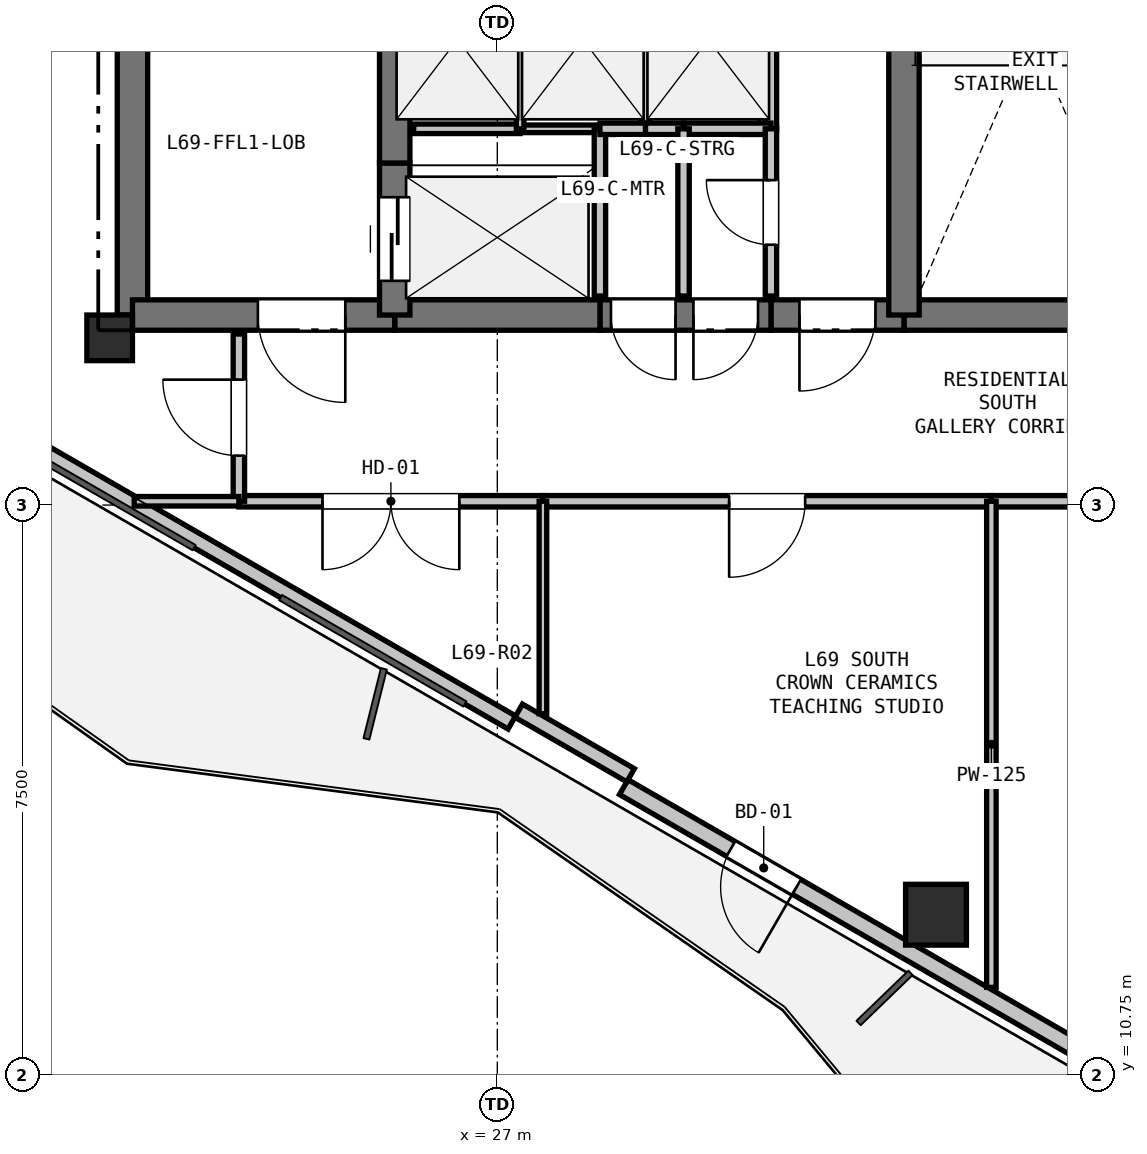
"""IFC4 building model, lengths in metres.
Left out: names, types, materials, properties, quantities, classifications, styles, units other than length and angle.
Written with IfcOpenShell. Run it as: python <this file> out.ifc"""

import sys

from ifc_helpers import new_model, si_unit, direction, frame, frame_2d, origin, origin_2d, place, context, subcontext, project, spatial, rectangle, hollow_rectangle, extrude, element, fill, save


model = new_model("IFC4")
c1 = context("Model", 3, precision=1e-05, world=origin(), true_north=direction((0.0, 1.0)))
c2 = subcontext(c1, "Body", "Model", "MODEL_VIEW")
j1 = project(units=[si_unit("LENGTHUNIT", "METRE"), si_unit("PLANEANGLEUNIT", "RADIAN")], contexts=[c1])
p1 = place(None, origin())
s1 = spatial("IfcSite", under=j1, at=p1, CompositionType="ELEMENT")
p2 = place(p1, origin())
s2 = spatial("IfcBuilding", under=s1, at=p2, CompositionType="ELEMENT")
p3 = place(p2, frame((0.0, 0.0, 246.3)))
s3 = spatial("IfcBuildingStorey", under=s2, at=p3, CompositionType="ELEMENT", Elevation=246.3)
p4 = place(p3, frame((21.9, 20.45, 0.0), z_axis=(0.0, 0.0, 1.0), x_axis=(1.0, 0.0, 0.0)))
e1 = element("IfcColumn", 1, at=p4, inside=s3, PredefinedType="COLUMN", context=c2, shape_type="SweptSolid", body=[
    extrude(rectangle(XDim=0.6, YDim=0.6, at=origin_2d()), origin(), (0.0, 0.0, 1.0), 3.3),
])
p5 = place(p3, frame((32.771, 12.861, 0.0), z_axis=(0.0, 0.0, 1.0), x_axis=(1.0, 0.0, 0.0)))
e2 = element("IfcColumn", 2, at=p5, inside=s3, PredefinedType="COLUMN", context=c2, shape_type="SweptSolid", body=[
    extrude(hollow_rectangle(XDim=0.8, YDim=0.8, WallThickness=0.025, at=origin_2d()), origin(), (0.0, 0.0, 1.0), 3.3),
])
p6 = place(p3, frame((36.395, 10.076, 0.0), z_axis=(0.0, 0.0, 1.0), x_axis=(-0.866026655105, 0.499997832642, 0.0)))
e3 = element("IfcWall", 3, at=p6, inside=s3, PredefinedType="SOLIDWALL", context=c2, shape_type="SweptSolid", body=[
    extrude(rectangle(XDim=8.928, YDim=0.225, at=frame_2d((4.464, 0.0))), origin(), (0.0, 0.0, 1.0), 2.64),
])
p7 = place(p6, frame((6.302, 0.0, 0.0)))
e4 = element("IfcOpeningElement", 4, at=p7, cuts=e3, PredefinedType="OPENING", context=c2, shape_type="SweptSolid", body=[
    extrude(rectangle(XDim=1.0, YDim=2.1, at=frame_2d((0.5, 1.05))), frame((0.0, 0.123, 0.0), z_axis=(0.0, -1.0, 0.0), x_axis=(1.0, 0.0, 0.0)), (0.0, 0.0, 1.0), 0.245),
])
p8 = place(p3, frame((27.191, 15.389, 0.0), z_axis=(0.0, 0.0, 1.0), x_axis=(-0.866019557082, 0.500010126649, 0.0)))
e5 = element("IfcWall", 5, at=p8, inside=s3, PredefinedType="PARAPET", context=c2, shape_type="SweptSolid", body=[
    extrude(rectangle(XDim=8.228, YDim=0.2, at=frame_2d((4.114, 0.0))), origin(), (0.0, 0.0, 1.0), 0.2),
])
p9 = place(p3, frame((28.754, 14.695, 0.0), z_axis=(0.0, 0.0, 1.0), x_axis=(-0.866025371046, 0.500000056704, 0.0)))
e6 = element("IfcWall", 6, at=p9, inside=s3, PredefinedType="PARAPET", context=c2, shape_type="SweptSolid", body=[
    extrude(rectangle(XDim=1.7, YDim=0.2, at=frame_2d((0.85, 0.0))), origin(), (0.0, 0.0, 1.0), 2.64),
])
p10 = place(p3, frame((22.2, 20.75, 0.0), z_axis=(0.0, 0.0, 1.0), x_axis=(0.0, 1.0, 0.0)))
e7 = element("IfcWall", 7, at=p10, inside=s3, PredefinedType="SHEAR", context=c2, shape_type="SweptSolid", body=[
    extrude(rectangle(XDim=4.65, YDim=0.4, at=frame_2d((2.325, 0.0))), origin(), (0.0, 0.0, 1.0), 3.02),
])
p11 = place(p3, frame((35.8, 20.75, 0.0), z_axis=(0.0, 0.0, 1.0), x_axis=(-1.0, 0.0, 0.0)))
e8 = element("IfcWall", 8, at=p11, inside=s3, PredefinedType="SHEAR", context=c2, shape_type="SweptSolid", body=[
    extrude(rectangle(XDim=3.45, YDim=0.4, at=frame_2d((1.725, 0.0))), origin(), (0.0, 0.0, 1.0), 3.02),
])
p12 = place(p3, frame((32.35, 20.75, 0.0), z_axis=(0.0, 0.0, 1.0), x_axis=(-1.0, 0.0, 0.0)))
e9 = element("IfcWall", 9, at=p12, inside=s3, PredefinedType="SHEAR", context=c2, shape_type="SweptSolid", body=[
    extrude(rectangle(XDim=1.75, YDim=0.4, at=frame_2d((0.875, 0.0))), origin(), (0.0, 0.0, 1.0), 3.02),
])
p13 = place(p12, frame((0.375, 0.0, 0.0)))
e10 = element("IfcOpeningElement", 10, at=p13, cuts=e9, PredefinedType="OPENING", context=c2, shape_type="SweptSolid", body=[
    extrude(rectangle(XDim=1.0, YDim=2.15, at=frame_2d((0.5, 1.075))), frame((0.0, 0.21, 0.0), z_axis=(0.0, -1.0, 0.0), x_axis=(1.0, 0.0, 0.0)), (0.0, 0.0, 1.0), 0.42),
])
p14 = place(p3, frame((30.6, 20.75, 0.0), z_axis=(0.0, 0.0, 1.0), x_axis=(-1.0, 0.0, 0.0)))
e11 = element("IfcWall", 11, at=p14, inside=s3, PredefinedType="SHEAR", context=c2, shape_type="SweptSolid", body=[
    extrude(rectangle(XDim=2.25, YDim=0.4, at=frame_2d((1.125, 0.0))), origin(), (0.0, 0.0, 1.0), 3.02),
])
p15 = place(p14, frame((1.255, 0.0, 0.0)))
e12 = element("IfcOpeningElement", 12, at=p15, cuts=e11, PredefinedType="OPENING", context=c2, shape_type="SweptSolid", body=[
    extrude(rectangle(XDim=0.85, YDim=2.1, at=frame_2d((0.425, 1.05))), frame((0.0, 0.21, 0.0), z_axis=(0.0, -1.0, 0.0), x_axis=(1.0, 0.0, 0.0)), (0.0, 0.0, 1.0), 0.42),
])
p16 = place(p14, frame((0.17, 0.0, 0.0)))
e13 = element("IfcOpeningElement", 13, at=p16, cuts=e11, PredefinedType="OPENING", context=c2, shape_type="SweptSolid", body=[
    extrude(rectangle(XDim=0.85, YDim=2.1, at=frame_2d((0.425, 1.05))), frame((0.0, 0.21, 0.0), z_axis=(0.0, -1.0, 0.0), x_axis=(1.0, 0.0, 0.0)), (0.0, 0.0, 1.0), 0.42),
])
p17 = place(p3, frame((28.35, 20.75, 0.0), z_axis=(0.0, 0.0, 1.0), x_axis=(-1.0, 0.0, 0.0)))
e14 = element("IfcWall", 14, at=p17, inside=s3, PredefinedType="SHEAR", context=c2, shape_type="SweptSolid", body=[
    extrude(rectangle(XDim=2.7, YDim=0.4, at=frame_2d((1.35, 0.0))), origin(), (0.0, 0.0, 1.0), 3.02),
])
p18 = place(p3, frame((25.65, 20.75, 0.0), z_axis=(0.0, 0.0, 1.0), x_axis=(-1.0, 0.0, 0.0)))
e15 = element("IfcWall", 15, at=p18, inside=s3, PredefinedType="SHEAR", context=c2, shape_type="SweptSolid", body=[
    extrude(rectangle(XDim=3.45, YDim=0.4, at=frame_2d((1.725, 0.0))), origin(), (0.0, 0.0, 1.0), 3.02),
])
p19 = place(p18, frame((0.65, 0.0, 0.0)))
e16 = element("IfcOpeningElement", 16, at=p19, cuts=e15, PredefinedType="OPENING", context=c2, shape_type="SweptSolid", body=[
    extrude(rectangle(XDim=1.15, YDim=2.15, at=frame_2d((0.575, 1.075))), frame((0.0, 0.21, 0.0), z_axis=(0.0, -1.0, 0.0), x_axis=(1.0, 0.0, 0.0)), (0.0, 0.0, 1.0), 0.42),
])
p20 = place(p3, frame((25.65, 20.75, 0.0), z_axis=(0.0, 0.0, 1.0), x_axis=(0.0, 1.0, 0.0)))
e17 = element("IfcWall", 17, at=p20, inside=s3, PredefinedType="SHEAR", context=c2, shape_type="SweptSolid", body=[
    extrude(rectangle(XDim=2.0, YDim=0.4, at=frame_2d((1.0, 0.0))), origin(), (0.0, 0.0, 1.0), 3.02),
])
p21 = place(p20, frame((0.45, 0.0, 0.0)))
e18 = element("IfcOpeningElement", 18, at=p21, cuts=e17, PredefinedType="OPENING", context=c2, shape_type="SweptSolid", body=[
    extrude(rectangle(XDim=1.1, YDim=2.15, at=frame_2d((0.55, 1.075))), frame((0.0, 0.21, 0.0), z_axis=(0.0, -1.0, 0.0), x_axis=(1.0, 0.0, 0.0)), (0.0, 0.0, 1.0), 0.42),
])
p22 = place(p3, frame((25.65, 22.75, 0.0), z_axis=(0.0, 0.0, 1.0), x_axis=(0.0, 1.0, 0.0)))
e19 = element("IfcWall", 19, at=p22, inside=s3, PredefinedType="SHEAR", context=c2, shape_type="SweptSolid", body=[
    extrude(rectangle(XDim=2.8, YDim=0.4, at=frame_2d((1.4, 0.0))), origin(), (0.0, 0.0, 1.0), 3.02),
])
p23 = place(p3, frame((32.35, 20.75, 0.0), z_axis=(0.0, 0.0, 1.0), x_axis=(0.0, 1.0, 0.0)))
e20 = element("IfcWall", 20, at=p23, inside=s3, PredefinedType="SHEAR", context=c2, shape_type="SweptSolid", body=[
    extrude(rectangle(XDim=4.8, YDim=0.4, at=frame_2d((2.4, 0.0))), origin(), (0.0, 0.0, 1.0), 3.02),
])
p24 = place(p3, frame((25.9, 23.2, 0.0), z_axis=(0.0, 0.0, 1.0), x_axis=(1.0, 0.0, 0.0)))
e21 = element("IfcWall", 21, at=p24, inside=s3, PredefinedType="PARTITIONING", context=c2, shape_type="SweptSolid", body=[
    extrude(rectangle(XDim=1.4, YDim=0.125, at=frame_2d((0.7, 0.0))), origin(), (0.0, 0.0, 1.0), 3.02),
])
p25 = place(p3, frame((27.3, 23.2, 0.0), z_axis=(0.0, 0.0, 1.0), x_axis=(1.0, 0.0, 0.0)))
e22 = element("IfcWall", 22, at=p25, inside=s3, PredefinedType="PARTITIONING", context=c2, shape_type="SweptSolid", body=[
    extrude(rectangle(XDim=1.05, YDim=0.1, at=frame_2d((0.525, 0.0))), origin(), (0.0, 0.0, 1.0), 3.02),
])
p26 = place(p3, frame((28.35, 23.2, 0.0), z_axis=(0.0, 0.0, 1.0), x_axis=(0.0, -1.0, 0.0)))
e23 = element("IfcWall", 23, at=p26, inside=s3, PredefinedType="PARTITIONING", context=c2, shape_type="SweptSolid", body=[
    extrude(rectangle(XDim=2.2, YDim=0.15, at=frame_2d((1.1, 0.0))), origin(), (0.0, 0.0, 1.0), 3.02),
])
p27 = place(p3, frame((27.3, 25.4, 0.0), z_axis=(0.0, 0.0, 1.0), x_axis=(0.0, -1.0, 0.0)))
e24 = element("IfcWall", 24, at=p27, inside=s3, PredefinedType="PARTITIONING", context=c2, shape_type="SweptSolid", body=[
    extrude(rectangle(XDim=2.2, YDim=0.1, at=frame_2d((1.1, 0.0))), origin(), (0.0, 0.0, 1.0), 3.02),
])
p28 = place(p3, frame((28.95, 25.4, 0.0), z_axis=(0.0, 0.0, 1.0), x_axis=(0.0, -1.0, 0.0)))
e25 = element("IfcWall", 25, at=p28, inside=s3, PredefinedType="PARTITIONING", context=c2, shape_type="SweptSolid", body=[
    extrude(rectangle(XDim=2.2, YDim=0.125, at=frame_2d((1.1, 0.0))), origin(), (0.0, 0.0, 1.0), 3.02),
])
p29 = place(p3, frame((28.95, 23.2, 0.0), z_axis=(0.0, 0.0, 1.0), x_axis=(-1.0, 0.0, 0.0)))
e26 = element("IfcWall", 26, at=p29, inside=s3, PredefinedType="PARTITIONING", context=c2, shape_type="SweptSolid", body=[
    extrude(rectangle(XDim=0.6, YDim=0.15, at=frame_2d((0.3, 0.0))), origin(), (0.0, 0.0, 1.0), 3.02),
])
p30 = place(p3, frame((30.6, 25.4, 0.0), z_axis=(0.0, 0.0, 1.0), x_axis=(0.0, -1.0, 0.0)))
e27 = element("IfcWall", 27, at=p30, inside=s3, PredefinedType="PARTITIONING", context=c2, shape_type="SweptSolid", body=[
    extrude(rectangle(XDim=2.2, YDim=0.15, at=frame_2d((1.1, 0.0))), origin(), (0.0, 0.0, 1.0), 3.02),
])
p31 = place(p3, frame((30.6, 23.2, 0.0), z_axis=(0.0, 0.0, 1.0), x_axis=(-1.0, 0.0, 0.0)))
e28 = element("IfcWall", 28, at=p31, inside=s3, PredefinedType="PARTITIONING", context=c2, shape_type="SweptSolid", body=[
    extrude(rectangle(XDim=1.15, YDim=0.15, at=frame_2d((0.575, 0.0))), origin(), (0.0, 0.0, 1.0), 3.02),
])
p32 = place(p3, frame((29.45, 23.2, 0.0), z_axis=(0.0, 0.0, 1.0), x_axis=(-1.0, 0.0, 0.0)))
e29 = element("IfcWall", 29, at=p32, inside=s3, PredefinedType="PARTITIONING", context=c2, shape_type="SweptSolid", body=[
    extrude(rectangle(XDim=0.5, YDim=0.15, at=frame_2d((0.25, 0.0))), origin(), (0.0, 0.0, 1.0), 3.02),
])
p33 = place(p3, frame((30.6, 21.0, 0.0), z_axis=(0.0, 0.0, 1.0), x_axis=(0.0, 1.0, 0.0)))
e30 = element("IfcWall", 30, at=p33, inside=s3, PredefinedType="PARTITIONING", context=c2, shape_type="SweptSolid", body=[
    extrude(rectangle(XDim=2.2, YDim=0.15, at=frame_2d((1.1, 0.0))), origin(), (0.0, 0.0, 1.0), 3.02),
])
p34 = place(p33, frame((0.675, 0.0, 0.0)))
e31 = element("IfcOpeningElement", 31, at=p34, cuts=e30, PredefinedType="OPENING", context=c2, shape_type="SweptSolid", body=[
    extrude(rectangle(XDim=0.85, YDim=2.1, at=frame_2d((0.425, 1.05))), frame((0.0, 0.085, 0.0), z_axis=(0.0, -1.0, 0.0), x_axis=(1.0, 0.0, 0.0)), (0.0, 0.0, 1.0), 0.17),
])
p35 = place(p3, frame((38.2, 18.3, 0.0), z_axis=(0.0, 0.0, 1.0), x_axis=(-1.0, 0.0, 0.0)))
e32 = element("IfcWall", 32, at=p35, inside=s3, PredefinedType="PARTITIONING", context=c2, shape_type="SweptSolid", body=[
    extrude(rectangle(XDim=4.7, YDim=0.15, at=frame_2d((2.35, 0.0))), origin(), (0.0, 0.0, 1.0), 2.468),
])
p36 = place(p35, frame((1.85, 0.0, 0.0)))
e33 = element("IfcOpeningElement", 33, at=p36, cuts=e32, PredefinedType="OPENING", context=c2, shape_type="SweptSolid", body=[
    extrude(rectangle(XDim=1.0, YDim=2.15, at=frame_2d((0.5, 1.075))), frame((0.0, 0.085, 0.0), z_axis=(0.0, -1.0, 0.0), x_axis=(1.0, 0.0, 0.0)), (0.0, 0.0, 1.0), 0.17),
])
p37 = place(p3, frame((33.5, 18.3, 0.0), z_axis=(0.0, 0.0, 1.0), x_axis=(-1.0, 0.0, 0.0)))
e34 = element("IfcWall", 34, at=p37, inside=s3, PredefinedType="PARTITIONING", context=c2, shape_type="SweptSolid", body=[
    extrude(rectangle(XDim=5.9, YDim=0.15, at=frame_2d((2.95, 0.0))), origin(), (0.0, 0.0, 1.0), 3.02),
])
p38 = place(p37, frame((2.45, 0.0, 0.0)))
e35 = element("IfcOpeningElement", 35, at=p38, cuts=e34, PredefinedType="OPENING", context=c2, shape_type="SweptSolid", body=[
    extrude(rectangle(XDim=1.0, YDim=2.15, at=frame_2d((0.5, 1.075))), frame((0.0, 0.085, 0.0), z_axis=(0.0, -1.0, 0.0), x_axis=(1.0, 0.0, 0.0)), (0.0, 0.0, 1.0), 0.17),
])
p39 = place(p3, frame((27.6, 18.3, 0.0), z_axis=(0.0, 0.0, 1.0), x_axis=(-1.0, 0.0, 0.0)))
e36 = element("IfcWall", 36, at=p39, inside=s3, PredefinedType="PARTITIONING", context=c2, shape_type="SweptSolid", body=[
    extrude(rectangle(XDim=4.0, YDim=0.15, at=frame_2d((2.0, 0.0))), origin(), (0.0, 0.0, 1.0), 2.365),
])
p40 = place(p39, frame((1.1, 0.0, 0.0)))
e37 = element("IfcOpeningElement", 37, at=p40, cuts=e36, PredefinedType="OPENING", context=c2, shape_type="SweptSolid", body=[
    extrude(rectangle(XDim=1.8, YDim=2.2, at=frame_2d((0.9, 1.1))), frame((0.0, 0.085, 0.0), z_axis=(0.0, -1.0, 0.0), x_axis=(1.0, 0.0, 0.0)), (0.0, 0.0, 1.0), 0.17),
])
p41 = place(p3, frame((23.6, 18.3, 0.0), z_axis=(0.0, 0.0, 1.0), x_axis=(0.0, 1.0, 0.0)))
e38 = element("IfcWall", 38, at=p41, inside=s3, PredefinedType="PARTITIONING", context=c2, shape_type="SweptSolid", body=[
    extrude(rectangle(XDim=2.2, YDim=0.15, at=frame_2d((1.1, 0.0))), origin(), (0.0, 0.0, 1.0), 2.468),
])
p42 = place(p41, frame((0.6, 0.0, 0.0)))
e39 = element("IfcOpeningElement", 39, at=p42, cuts=e38, PredefinedType="OPENING", context=c2, shape_type="SweptSolid", body=[
    extrude(rectangle(XDim=1.0, YDim=2.15, at=frame_2d((0.5, 1.075))), frame((0.0, 0.085, 0.0), z_axis=(0.0, -1.0, 0.0), x_axis=(1.0, 0.0, 0.0)), (0.0, 0.0, 1.0), 0.17),
])
p43 = place(p3, frame((29.45, 23.2, 0.0), z_axis=(0.0, 0.0, 1.0), x_axis=(0.0, -1.0, 0.0)))
e40 = element("IfcWall", 40, at=p43, inside=s3, PredefinedType="PARTITIONING", context=c2, shape_type="SweptSolid", body=[
    extrude(rectangle(XDim=2.2, YDim=0.15, at=frame_2d((1.1, 0.0))), origin(), (0.0, 0.0, 1.0), 3.02),
])
p44 = place(p3, frame((22.223, 18.3, 0.0), z_axis=(0.0, 0.0, 1.0), x_axis=(1.0, 0.0, 0.0)))
e41 = element("IfcWall", 41, at=p44, inside=s3, PredefinedType="PARTITIONING", context=c2, shape_type="SweptSolid", body=[
    extrude(rectangle(XDim=1.377, YDim=0.125, at=frame_2d((0.688, 0.0))), origin(), (0.0, 0.0, 1.0), 2.365),
])
p45 = place(p3, frame((27.6, 18.3, 0.0), z_axis=(0.0, 0.0, 1.0), x_axis=(0.0, -1.0, 0.0)))
e42 = element("IfcWall", 42, at=p45, inside=s3, PredefinedType="PARTITIONING", context=c2, shape_type="SweptSolid", body=[
    extrude(rectangle(XDim=2.795, YDim=0.1, at=frame_2d((1.398, 0.0))), origin(), (0.0, 0.0, 1.0), 2.365),
])
p46 = place(p3, frame((33.5, 18.3, 0.0), z_axis=(0.0, 0.0, 1.0), x_axis=(0.0, -1.0, 0.0)))
e43 = element("IfcWall", 43, at=p46, inside=s3, PredefinedType="PARTITIONING", context=c2, shape_type="SweptSolid", body=[
    extrude(rectangle(XDim=6.395, YDim=0.125, at=frame_2d((3.198, 0.0))), origin(), (0.0, 0.0, 1.0), 2.745),
])
p47 = place(p7, origin())
e44 = element("IfcDoor", 44, at=p47, inside=s3, OperationType="SINGLE_SWING_LEFT", PredefinedType="DOOR", context=c2, shape_type="SweptSolid", body=[
    extrude(rectangle(XDim=1.0, YDim=2.1, at=frame_2d((0.5, 1.05))), frame((0.0, 0.025, 0.0), z_axis=(0.0, -1.0, 0.0), x_axis=(1.0, 0.0, 0.0)), (0.0, 0.0, 1.0), 0.05),
])
fill(e4, e44)
p48 = place(p13, origin())
e45 = element("IfcDoor", 45, at=p48, inside=s3, OperationType="SINGLE_SWING_RIGHT", PredefinedType="DOOR", context=c2, shape_type="SweptSolid", body=[
    extrude(rectangle(XDim=1.0, YDim=2.15, at=frame_2d((0.5, 1.075))), frame((0.0, 0.025, 0.0), z_axis=(0.0, -1.0, 0.0), x_axis=(1.0, 0.0, 0.0)), (0.0, 0.0, 1.0), 0.05),
])
fill(e10, e45)
p49 = place(p21, origin())
e46 = element("IfcDoor", 46, at=p49, inside=s3, OperationType="SLIDING_TO_LEFT", PredefinedType="DOOR", context=c2, shape_type="SweptSolid", body=[
    extrude(rectangle(XDim=1.1, YDim=2.15, at=frame_2d((0.55, 1.075))), frame((0.0, 0.025, 0.0), z_axis=(0.0, -1.0, 0.0), x_axis=(1.0, 0.0, 0.0)), (0.0, 0.0, 1.0), 0.05),
])
fill(e18, e46)
p50 = place(p19, origin())
e47 = element("IfcDoor", 47, at=p50, inside=s3, OperationType="SINGLE_SWING_LEFT", PredefinedType="DOOR", context=c2, shape_type="SweptSolid", body=[
    extrude(rectangle(XDim=1.15, YDim=2.15, at=frame_2d((0.575, 1.075))), frame((0.0, 0.025, 0.0), z_axis=(0.0, -1.0, 0.0), x_axis=(1.0, 0.0, 0.0)), (0.0, 0.0, 1.0), 0.05),
])
fill(e16, e47)
p51 = place(p34, origin())
e48 = element("IfcDoor", 48, at=p51, inside=s3, OperationType="SINGLE_SWING_RIGHT", PredefinedType="DOOR", context=c2, shape_type="SweptSolid", body=[
    extrude(rectangle(XDim=0.85, YDim=2.1, at=frame_2d((0.425, 1.05))), frame((0.0, 0.025, 0.0), z_axis=(0.0, -1.0, 0.0), x_axis=(1.0, 0.0, 0.0)), (0.0, 0.0, 1.0), 0.05),
])
fill(e31, e48)
p52 = place(p15, origin())
e49 = element("IfcDoor", 49, at=p52, inside=s3, OperationType="SINGLE_SWING_LEFT", PredefinedType="DOOR", context=c2, shape_type="SweptSolid", body=[
    extrude(rectangle(XDim=0.85, YDim=2.1, at=frame_2d((0.425, 1.05))), frame((0.0, 0.025, 0.0), z_axis=(0.0, -1.0, 0.0), x_axis=(1.0, 0.0, 0.0)), (0.0, 0.0, 1.0), 0.05),
])
fill(e12, e49)
p53 = place(p16, origin())
e50 = element("IfcDoor", 50, at=p53, inside=s3, OperationType="SINGLE_SWING_RIGHT", PredefinedType="DOOR", context=c2, shape_type="SweptSolid", body=[
    extrude(rectangle(XDim=0.85, YDim=2.1, at=frame_2d((0.425, 1.05))), frame((0.0, 0.025, 0.0), z_axis=(0.0, -1.0, 0.0), x_axis=(1.0, 0.0, 0.0)), (0.0, 0.0, 1.0), 0.05),
])
fill(e13, e50)
p54 = place(p40, origin())
e51 = element("IfcDoor", 51, at=p54, inside=s3, OperationType="DOUBLE_DOOR_SINGLE_SWING", PredefinedType="DOOR", context=c2, shape_type="SweptSolid", body=[
    extrude(rectangle(XDim=1.8, YDim=2.2, at=frame_2d((0.9, 1.1))), frame((0.0, 0.025, 0.0), z_axis=(0.0, -1.0, 0.0), x_axis=(1.0, 0.0, 0.0)), (0.0, 0.0, 1.0), 0.05),
])
fill(e37, e51)
p55 = place(p38, origin())
e52 = element("IfcDoor", 52, at=p55, inside=s3, OperationType="SINGLE_SWING_RIGHT", PredefinedType="DOOR", context=c2, shape_type="SweptSolid", body=[
    extrude(rectangle(XDim=1.0, YDim=2.15, at=frame_2d((0.5, 1.075))), frame((0.0, 0.025, 0.0), z_axis=(0.0, -1.0, 0.0), x_axis=(1.0, 0.0, 0.0)), (0.0, 0.0, 1.0), 0.05),
])
fill(e35, e52)
p56 = place(p42, origin())
e53 = element("IfcDoor", 53, at=p56, inside=s3, OperationType="SINGLE_SWING_RIGHT", PredefinedType="DOOR", context=c2, shape_type="SweptSolid", body=[
    extrude(rectangle(XDim=1.0, YDim=2.15, at=frame_2d((0.5, 1.075))), frame((0.0, 0.025, 0.0), z_axis=(0.0, -1.0, 0.0), x_axis=(1.0, 0.0, 0.0)), (0.0, 0.0, 1.0), 0.05),
])
fill(e39, e53)
save(model, sys.argv[1])
